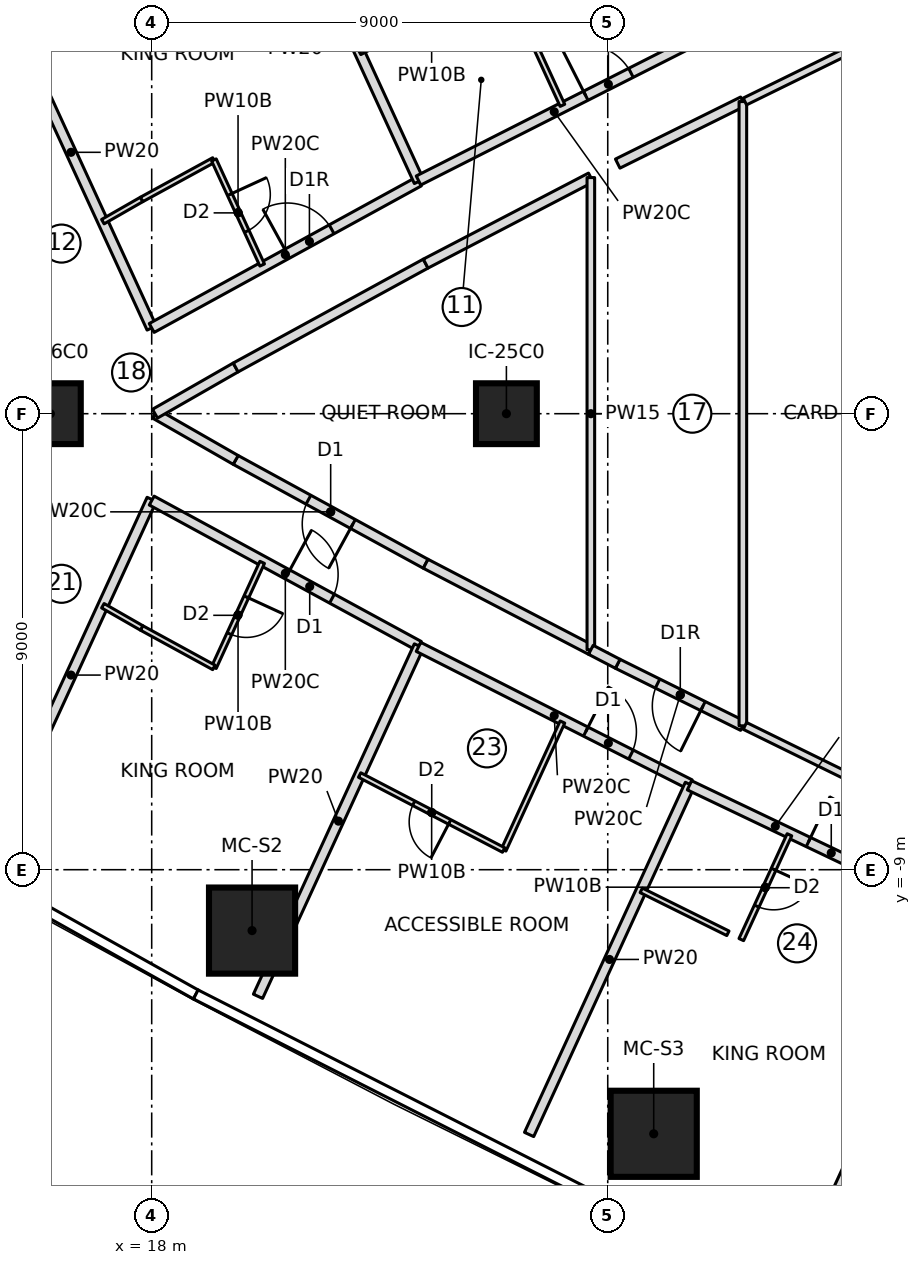
"""IFC4 building model, lengths in metres.
Left out: names, types, materials, properties, quantities, classifications, styles, units other than length and angle.
Written with IfcOpenShell. Run it as: python <this file> out.ifc"""

import sys

from ifc_helpers import new_model, si_unit, direction, frame, frame_2d, origin, origin_2d, place, context, subcontext, project, spatial, rectangle, extrude, element, fill, save


model = new_model("IFC4")
c1 = context("Model", 3, precision=1e-05, world=origin(), true_north=direction((0.0, 1.0)))
c2 = subcontext(c1, "Body", "Model", "MODEL_VIEW")
j1 = project(units=[si_unit("LENGTHUNIT", "METRE"), si_unit("PLANEANGLEUNIT", "RADIAN")], contexts=[c1])
p1 = place(None, origin())
s1 = spatial("IfcSite", under=j1, at=p1, CompositionType="ELEMENT")
p2 = place(p1, origin())
s2 = spatial("IfcBuilding", under=s1, at=p2, CompositionType="ELEMENT")
p3 = place(p2, frame((0.0, 0.0, 102.65)))
s3 = spatial("IfcBuildingStorey", under=s2, at=p3, CompositionType="ELEMENT", Elevation=102.65)
for number, where, z_axis, x_axis in (
    (1, (19.981, -10.202, 0.0), (0.0, 0.0, 1.0), (1.0, 0.0, 0.0)),
    (2, (27.907, -14.212, 0.0), (0.0, 0.0, 1.0), (1.0, 0.0, 0.0)),
):
    element("IfcColumn", number, at=place(p3, frame(where, z_axis=z_axis, x_axis=x_axis)), inside=s3, PredefinedType="COLUMN", context=c2, shape_type="SweptSolid", body=[
        extrude(rectangle(XDim=1.7, YDim=1.7, at=origin_2d()), origin(), (0.0, 0.0, 1.0), 3.55),
    ])
for number, where, z_axis, x_axis in (
    (3, (16.0, 0.0, 0.0), (0.0, 0.0, 1.0), (1.0, 0.0, 0.0)),
    (4, (25.0, 0.0, 0.0), (0.0, 0.0, 1.0), (1.0, 0.0, 0.0)),
):
    element("IfcColumn", number, at=place(p3, frame(where, z_axis=z_axis, x_axis=x_axis)), inside=s3, PredefinedType="COLUMN", context=c2, shape_type="SweptSolid", body=[
        extrude(rectangle(XDim=1.2, YDim=1.2, at=origin_2d()), origin(), (0.0, 0.0, 1.0), 3.55),
    ])
p4 = place(p3, frame((14.815, 8.626, 0.0), z_axis=(0.0, 0.0, 1.0), x_axis=(0.417432341259, -0.908708006166, 0.0)))
e5 = element("IfcWall", 5, at=p4, inside=s3, PredefinedType="PARTITIONING", context=c2, shape_type="SweptSolid", body=[
    extrude(rectangle(XDim=7.631, YDim=0.2, at=frame_2d((3.815, 0.0))), origin(), (0.0, 0.0, 1.0), 3.25),
])
p5 = place(p3, frame((18.0, 1.692, 0.0), z_axis=(0.0, 0.0, 1.0), x_axis=(0.876809096721, 0.480838650597, 0.0)))
e6 = element("IfcWall", 6, at=p5, inside=s3, PredefinedType="PARTITIONING", context=c2, shape_type="SweptSolid", body=[
    extrude(rectangle(XDim=6.015, YDim=0.2, at=frame_2d((3.008, 0.0))), origin(), (0.0, 0.0, 1.0), 3.25),
])
p6 = place(p5, frame((3.05, 0.0, 0.0)))
e7 = element("IfcOpeningElement", 7, at=p6, cuts=e6, PredefinedType="OPENING", context=c2, shape_type="SweptSolid", body=[
    extrude(rectangle(XDim=1.0, YDim=2.1, at=frame_2d((0.5, 1.05))), frame((0.0, 0.11, 0.0), z_axis=(0.0, -1.0, 0.0), x_axis=(1.0, 0.0, 0.0)), (0.0, 0.0, 1.0), 0.22),
])
p7 = place(p3, frame((17.036, 3.79, 0.0), z_axis=(0.0, 0.0, 1.0), x_axis=(0.867629162742, 0.497211862248, 0.0)))
e8 = element("IfcWall", 8, at=p7, inside=s3, PredefinedType="PARTITIONING", context=c2, shape_type="SweptSolid", body=[
    extrude(rectangle(XDim=0.882, YDim=0.1, at=frame_2d((0.441, 0.0))), origin(), (0.0, 0.0, 1.0), 3.25),
])
p8 = place(p3, frame((17.801, 4.229, 0.0), z_axis=(0.0, 0.0, 1.0), x_axis=(0.877424481957, 0.479714788663, 0.0)))
e9 = element("IfcWall", 9, at=p8, inside=s3, PredefinedType="PARTITIONING", context=c2, shape_type="SweptSolid", body=[
    extrude(rectangle(XDim=1.625, YDim=0.1, at=frame_2d((0.813, 0.0))), origin(), (0.0, 0.0, 1.0), 3.25),
])
p9 = place(p3, frame((19.228, 5.008, 0.0), z_axis=(0.0, 0.0, 1.0), x_axis=(0.417450047292, -0.908699872354, 0.0)))
e10 = element("IfcWall", 10, at=p9, inside=s3, PredefinedType="PARTITIONING", context=c2, shape_type="SweptSolid", body=[
    extrude(rectangle(XDim=2.283, YDim=0.1, at=frame_2d((1.141, 0.0))), origin(), (0.0, 0.0, 1.0), 3.25),
])
p10 = place(p9, frame((0.75, 0.0, 0.0)))
e11 = element("IfcOpeningElement", 11, at=p10, cuts=e10, PredefinedType="OPENING", context=c2, shape_type="SweptSolid", body=[
    extrude(rectangle(XDim=0.8, YDim=2.1, at=frame_2d((0.4, 1.05))), frame((0.0, 0.06, 0.0), z_axis=(0.0, -1.0, 0.0), x_axis=(1.0, 0.0, 0.0)), (0.0, 0.0, 1.0), 0.12),
])
p11 = place(p3, frame((23.274, 4.584, 0.0), z_axis=(0.0, 0.0, 1.0), x_axis=(-0.417440028355, 0.908704474913, 0.0)))
e12 = element("IfcWall", 12, at=p11, inside=s3, PredefinedType="PARTITIONING", context=c2, shape_type="SweptSolid", body=[
    extrude(rectangle(XDim=7.61, YDim=0.2, at=frame_2d((3.805, 0.0))), origin(), (0.0, 0.0, 1.0), 3.25),
])
p12 = place(p3, frame((23.266, 4.602, 0.0), z_axis=(0.0, 0.0, 1.0), x_axis=(0.892007141151, 0.452021304958, 0.0)))
e13 = element("IfcWall", 13, at=p12, inside=s3, PredefinedType="PARTITIONING", context=c2, shape_type="SweptSolid", body=[
    extrude(rectangle(XDim=6.004, YDim=0.2, at=frame_2d((3.002, 0.0))), origin(), (0.0, 0.0, 1.0), 3.25),
])
p13 = place(p12, frame((3.7, 0.0, 0.0)))
e14 = element("IfcOpeningElement", 14, at=p13, cuts=e13, PredefinedType="OPENING", context=c2, shape_type="SweptSolid", body=[
    extrude(rectangle(XDim=1.0, YDim=2.1, at=frame_2d((0.5, 1.05))), frame((0.0, 0.11, 0.0), z_axis=(0.0, -1.0, 0.0), x_axis=(1.0, 0.0, 0.0)), (0.0, 0.0, 1.0), 0.22),
])
p14 = place(p3, frame((22.104, 7.132, 0.0), z_axis=(0.0, 0.0, 1.0), x_axis=(0.886865947566, 0.46202682936, 0.0)))
e15 = element("IfcWall", 15, at=p14, inside=s3, PredefinedType="PARTITIONING", context=c2, shape_type="SweptSolid", body=[
    extrude(rectangle(XDim=3.204, YDim=0.1, at=frame_2d((1.602, 0.0))), origin(), (0.0, 0.0, 1.0), 3.25),
])
p15 = place(p14, frame((1.2, 0.0, 0.0)))
e16 = element("IfcOpeningElement", 16, at=p15, cuts=e15, PredefinedType="OPENING", context=c2, shape_type="SweptSolid", body=[
    extrude(rectangle(XDim=0.8, YDim=2.1, at=frame_2d((0.4, 1.05))), frame((0.0, 0.06, 0.0), z_axis=(0.0, -1.0, 0.0), x_axis=(1.0, 0.0, 0.0)), (0.0, 0.0, 1.0), 0.12),
])
p16 = place(p3, frame((24.945, 8.612, 0.0), z_axis=(0.0, 0.0, 1.0), x_axis=(0.417431588167, -0.908708352113, 0.0)))
e17 = element("IfcWall", 17, at=p16, inside=s3, PredefinedType="PARTITIONING", context=c2, shape_type="SweptSolid", body=[
    extrude(rectangle(XDim=2.781, YDim=0.1, at=frame_2d((1.39, 0.0))), origin(), (0.0, 0.0, 1.0), 3.25),
])
p17 = place(p3, frame((14.815, -8.626, 0.0), z_axis=(0.0, 0.0, 1.0), x_axis=(0.417432341259, 0.908708006166, 0.0)))
e18 = element("IfcWall", 18, at=p17, inside=s3, PredefinedType="PARTITIONING", context=c2, shape_type="SweptSolid", body=[
    extrude(rectangle(XDim=7.631, YDim=0.2, at=frame_2d((3.815, 0.0))), origin(), (0.0, 0.0, 1.0), 3.25),
])
p18 = place(p3, frame((18.0, -1.715, 0.0), z_axis=(0.0, 0.0, 1.0), x_axis=(0.878415628048, -0.477897462225, 0.0)))
e19 = element("IfcWall", 19, at=p18, inside=s3, PredefinedType="PARTITIONING", context=c2, shape_type="SweptSolid", body=[
    extrude(rectangle(XDim=6.004, YDim=0.2, at=frame_2d((3.002, 0.0))), origin(), (0.0, 0.0, 1.0), 3.25),
])
p19 = place(p18, frame((3.05, 0.0, 0.0)))
e20 = element("IfcOpeningElement", 20, at=p19, cuts=e19, PredefinedType="OPENING", context=c2, shape_type="SweptSolid", body=[
    extrude(rectangle(XDim=1.0, YDim=2.1, at=frame_2d((0.5, 1.05))), frame((0.0, 0.11, 0.0), z_axis=(0.0, -1.0, 0.0), x_axis=(1.0, 0.0, 0.0)), (0.0, 0.0, 1.0), 0.22),
])
p20 = place(p3, frame((20.18, -2.934, 0.0), z_axis=(0.0, 0.0, 1.0), x_axis=(-0.417450047292, -0.908699872354, 0.0)))
e21 = element("IfcWall", 21, at=p20, inside=s3, PredefinedType="PARTITIONING", context=c2, shape_type="SweptSolid", body=[
    extrude(rectangle(XDim=2.283, YDim=0.1, at=frame_2d((1.141, 0.0))), origin(), (0.0, 0.0, 1.0), 3.25),
])
p21 = place(p20, frame((0.75, 0.0, 0.0)))
e22 = element("IfcOpeningElement", 22, at=p21, cuts=e21, PredefinedType="OPENING", context=c2, shape_type="SweptSolid", body=[
    extrude(rectangle(XDim=0.8, YDim=2.1, at=frame_2d((0.4, 1.05))), frame((0.0, 0.06, 0.0), z_axis=(0.0, -1.0, 0.0), x_axis=(1.0, 0.0, 0.0)), (0.0, 0.0, 1.0), 0.12),
])
p22 = place(p3, frame((19.228, -5.008, 0.0), z_axis=(0.0, 0.0, 1.0), x_axis=(-0.877424481957, 0.479714788663, 0.0)))
e23 = element("IfcWall", 23, at=p22, inside=s3, PredefinedType="PARTITIONING", context=c2, shape_type="SweptSolid", body=[
    extrude(rectangle(XDim=1.625, YDim=0.1, at=frame_2d((0.813, 0.0))), origin(), (0.0, 0.0, 1.0), 3.25),
])
p23 = place(p3, frame((17.801, -4.229, 0.0), z_axis=(0.0, 0.0, 1.0), x_axis=(-0.867629162742, 0.497211862248, 0.0)))
e24 = element("IfcWall", 24, at=p23, inside=s3, PredefinedType="PARTITIONING", context=c2, shape_type="SweptSolid", body=[
    extrude(rectangle(XDim=0.882, YDim=0.1, at=frame_2d((0.441, 0.0))), origin(), (0.0, 0.0, 1.0), 3.25),
])
p24 = place(p3, frame((20.098, -11.499, 0.0), z_axis=(0.0, 0.0, 1.0), x_axis=(0.417440028355, 0.908704474913, 0.0)))
e25 = element("IfcWall", 25, at=p24, inside=s3, PredefinedType="PARTITIONING", context=c2, shape_type="SweptSolid", body=[
    extrude(rectangle(XDim=7.61, YDim=0.2, at=frame_2d((3.805, 0.0))), origin(), (0.0, 0.0, 1.0), 3.25),
])
p25 = place(p3, frame((23.266, -4.602, 0.0), z_axis=(0.0, 0.0, 1.0), x_axis=(0.892007141151, -0.452021304958, 0.0)))
e26 = element("IfcWall", 26, at=p25, inside=s3, PredefinedType="PARTITIONING", context=c2, shape_type="SweptSolid", body=[
    extrude(rectangle(XDim=6.004, YDim=0.2, at=frame_2d((3.002, 0.0))), origin(), (0.0, 0.0, 1.0), 3.25),
])
p26 = place(p25, frame((3.7, 0.0, 0.0)))
e27 = element("IfcOpeningElement", 27, at=p26, cuts=e26, PredefinedType="OPENING", context=c2, shape_type="SweptSolid", body=[
    extrude(rectangle(XDim=1.0, YDim=2.1, at=frame_2d((0.5, 1.05))), frame((0.0, 0.11, 0.0), z_axis=(0.0, -1.0, 0.0), x_axis=(1.0, 0.0, 0.0)), (0.0, 0.0, 1.0), 0.22),
])
p27 = place(p3, frame((26.106, -6.085, 0.0), z_axis=(0.0, 0.0, 1.0), x_axis=(-0.417431588167, -0.908708352113, 0.0)))
e28 = element("IfcWall", 28, at=p27, inside=s3, PredefinedType="PARTITIONING", context=c2, shape_type="SweptSolid", body=[
    extrude(rectangle(XDim=2.781, YDim=0.1, at=frame_2d((1.39, 0.0))), origin(), (0.0, 0.0, 1.0), 3.25),
])
p28 = place(p3, frame((24.945, -8.612, 0.0), z_axis=(0.0, 0.0, 1.0), x_axis=(-0.886865947566, 0.46202682936, 0.0)))
e29 = element("IfcWall", 29, at=p28, inside=s3, PredefinedType="PARTITIONING", context=c2, shape_type="SweptSolid", body=[
    extrude(rectangle(XDim=3.204, YDim=0.1, at=frame_2d((1.602, 0.0))), origin(), (0.0, 0.0, 1.0), 3.25),
])
p29 = place(p28, frame((1.2, 0.0, 0.0)))
e30 = element("IfcOpeningElement", 30, at=p29, cuts=e29, PredefinedType="OPENING", context=c2, shape_type="SweptSolid", body=[
    extrude(rectangle(XDim=0.8, YDim=2.1, at=frame_2d((0.4, 1.05))), frame((0.0, 0.06, 0.0), z_axis=(0.0, -1.0, 0.0), x_axis=(1.0, 0.0, 0.0)), (0.0, 0.0, 1.0), 0.12),
])
p30 = place(p3, frame((25.448, -14.226, 0.0), z_axis=(0.0, 0.0, 1.0), x_axis=(0.417428513692, 0.908709764422, 0.0)))
e31 = element("IfcWall", 31, at=p30, inside=s3, PredefinedType="PARTITIONING", context=c2, shape_type="SweptSolid", body=[
    extrude(rectangle(XDim=7.603, YDim=0.2, at=frame_2d((3.802, 0.0))), origin(), (0.0, 0.0, 1.0), 3.25),
])
p31 = place(p3, frame((28.613, -7.335, 0.0), z_axis=(0.0, 0.0, 1.0), x_axis=(0.902499429765, -0.430691048518, 0.0)))
e32 = element("IfcWall", 32, at=p31, inside=s3, PredefinedType="PARTITIONING", context=c2, shape_type="SweptSolid", body=[
    extrude(rectangle(XDim=3.753, YDim=0.2, at=frame_2d((1.876, 0.0))), origin(), (0.0, 0.0, 1.0), 3.25),
])
p32 = place(p31, frame((2.6, 0.0, 0.0)))
e33 = element("IfcOpeningElement", 33, at=p32, cuts=e32, PredefinedType="OPENING", context=c2, shape_type="SweptSolid", body=[
    extrude(rectangle(XDim=1.0, YDim=2.1, at=frame_2d((0.5, 1.05))), frame((0.0, 0.11, 0.0), z_axis=(0.0, -1.0, 0.0), x_axis=(1.0, 0.0, 0.0)), (0.0, 0.0, 1.0), 0.22),
])
p33 = place(p3, frame((30.586, -8.31, 0.0), z_axis=(0.0, 0.0, 1.0), x_axis=(-0.417466676952, -0.908692232626, 0.0)))
e34 = element("IfcWall", 34, at=p33, inside=s3, PredefinedType="PARTITIONING", context=c2, shape_type="SweptSolid", body=[
    extrude(rectangle(XDim=2.277, YDim=0.1, at=frame_2d((1.139, 0.0))), origin(), (0.0, 0.0, 1.0), 3.25),
])
p34 = place(p33, frame((0.75, 0.0, 0.0)))
e35 = element("IfcOpeningElement", 35, at=p34, cuts=e34, PredefinedType="OPENING", context=c2, shape_type="SweptSolid", body=[
    extrude(rectangle(XDim=0.8, YDim=2.1, at=frame_2d((0.4, 1.05))), frame((0.0, 0.06, 0.0), z_axis=(0.0, -1.0, 0.0), x_axis=(1.0, 0.0, 0.0)), (0.0, 0.0, 1.0), 0.12),
])
p35 = place(p3, frame((29.371, -10.255, 0.0), z_axis=(0.0, 0.0, 1.0), x_axis=(-0.895982200486, 0.444089964324, 0.0)))
e36 = element("IfcWall", 36, at=p35, inside=s3, PredefinedType="PARTITIONING", context=c2, shape_type="SweptSolid", body=[
    extrude(rectangle(XDim=1.909, YDim=0.1, at=frame_2d((0.954, 0.0))), origin(), (0.0, 0.0, 1.0), 3.25),
])
p36 = place(p3, frame((30.861, -16.815, 0.0), z_axis=(0.0, 0.0, 1.0), x_axis=(0.417441426461, 0.908703832651, 0.0)))
e37 = element("IfcWall", 37, at=p36, inside=s3, PredefinedType="PARTITIONING", context=c2, shape_type="SweptSolid", body=[
    extrude(rectangle(XDim=6.399, YDim=0.2, at=frame_2d((3.2, 0.0))), origin(), (0.0, 0.0, 1.0), 3.25),
])
p37 = place(p3, frame((23.407, -2.962, 0.0), z_axis=(0.0, 0.0, 1.0), x_axis=(-0.877465075585, 0.479640533242, 0.0)))
e38 = element("IfcWall", 38, at=p37, inside=s3, PredefinedType="PARTITIONING", context=c2, shape_type="SweptSolid", body=[
    extrude(rectangle(XDim=4.273, YDim=0.2, at=frame_2d((2.137, 0.0))), origin(), (0.0, 0.0, 1.0), 3.25),
])
p38 = place(p37, frame((1.636, 0.0, 0.0)))
e39 = element("IfcOpeningElement", 39, at=p38, cuts=e38, PredefinedType="OPENING", context=c2, shape_type="SweptSolid", body=[
    extrude(rectangle(XDim=1.0, YDim=2.1, at=frame_2d((0.5, 1.05))), frame((0.0, 0.11, 0.0), z_axis=(0.0, -1.0, 0.0), x_axis=(1.0, 0.0, 0.0)), (0.0, 0.0, 1.0), 0.22),
])
for number, where, z_axis, x_axis in (
    (40, (19.657, -0.912, 0.0), (0.0, 0.0, 1.0), (-0.868, 0.497, 0.0)),
    (41, (18.065, 0.0, 0.0), (0.0, 0.0, 1.0), (0.868, 0.497, 0.0)),
):
    element("IfcWall", number, at=place(p3, frame(where, z_axis=z_axis, x_axis=x_axis)), inside=s3, PredefinedType="PARTITIONING", context=c2, shape_type="SweptSolid", body=[
        extrude(rectangle(XDim=1.835, YDim=0.2, at=frame_2d((0.918, 0.0))), origin(), (0.0, 0.0, 1.0), 3.25),
    ])
p39 = place(p3, frame((19.657, 0.912, 0.0), z_axis=(0.0, 0.0, 1.0), x_axis=(0.877465075585, 0.479640533242, 0.0)))
e42 = element("IfcWall", 42, at=p39, inside=s3, PredefinedType="PARTITIONING", context=c2, shape_type="SweptSolid", body=[
    extrude(rectangle(XDim=4.273, YDim=0.2, at=frame_2d((2.137, 0.0))), origin(), (0.0, 0.0, 1.0), 3.25),
])
for number, where, z_axis, x_axis in (
    (43, (23.407, 2.962, 0.0), (0.0, 0.0, 1.0), (0.887, 0.462, 0.0)),
    (44, (26.667, -4.66, 0.0), (0.0, 0.0, 1.0), (-0.887, 0.462, 0.0)),
):
    element("IfcWall", number, at=place(p3, frame(where, z_axis=z_axis, x_axis=x_axis)), inside=s3, PredefinedType="PARTITIONING", context=c2, shape_type="SweptSolid", body=[
        extrude(rectangle(XDim=3.676, YDim=0.2, at=frame_2d((1.838, 0.0))), origin(), (0.0, 0.0, 1.0), 3.25),
    ])
p40 = place(p3, frame((26.667, -4.66, 0.0), z_axis=(0.0, 0.0, 1.0), x_axis=(0.0, 1.0, 0.0)))
e45 = element("IfcWall", 45, at=p40, inside=s3, PredefinedType="PARTITIONING", context=c2, shape_type="SweptSolid", body=[
    extrude(rectangle(XDim=9.32, YDim=0.15, at=frame_2d((4.66, 0.0))), origin(), (0.0, 0.0, 1.0), 3.25),
])
p41 = place(p3, frame((29.667, -6.16, 0.0), z_axis=(0.0, 0.0, 1.0), x_axis=(-0.895945057464, 0.444164895062, 0.0)))
e46 = element("IfcWall", 46, at=p41, inside=s3, PredefinedType="PARTITIONING", context=c2, shape_type="SweptSolid", body=[
    extrude(rectangle(XDim=2.757, YDim=0.2, at=frame_2d((1.378, 0.0))), origin(), (0.0, 0.0, 1.0), 3.25),
])
p42 = place(p41, frame((0.878, 0.0, 0.0)))
e47 = element("IfcOpeningElement", 47, at=p42, cuts=e46, PredefinedType="OPENING", context=c2, shape_type="SweptSolid", body=[
    extrude(rectangle(XDim=1.0, YDim=2.1, at=frame_2d((0.5, 1.05))), frame((0.0, 0.11, 0.0), z_axis=(0.0, -1.0, 0.0), x_axis=(1.0, 0.0, 0.0)), (0.0, 0.0, 1.0), 0.22),
])
p43 = place(p3, frame((27.196, 4.936, 0.0), z_axis=(0.0, 0.0, 1.0), x_axis=(0.895945057464, 0.444164895062, 0.0)))
e48 = element("IfcWall", 48, at=p43, inside=s3, PredefinedType="PARTITIONING", context=c2, shape_type="SweptSolid", body=[
    extrude(rectangle(XDim=2.757, YDim=0.2, at=frame_2d((1.378, 0.0))), origin(), (0.0, 0.0, 1.0), 3.25),
])
p44 = place(p3, frame((29.667, -6.16, 0.0), z_axis=(0.0, 0.0, 1.0), x_axis=(0.0, 1.0, 0.0)))
e49 = element("IfcWall", 49, at=p44, inside=s3, PredefinedType="PARTITIONING", context=c2, shape_type="SweptSolid", body=[
    extrude(rectangle(XDim=12.321, YDim=0.15, at=frame_2d((6.16, 0.0))), origin(), (0.0, 0.0, 1.0), 3.25),
])
for number, where, z_axis, x_axis in (
    (50, (31.995, -7.285, 0.0), (0.0, 0.0, 1.0), (-0.898, 0.441, 0.0)),
    (51, (29.707, 6.162, 0.0), (0.0, 0.0, 1.0), (0.898, 0.441, 0.0)),
):
    element("IfcWall", number, at=place(p3, frame(where, z_axis=z_axis, x_axis=x_axis)), inside=s3, PredefinedType="PARTITIONING", context=c2, shape_type="SweptSolid", body=[
        extrude(rectangle(XDim=2.549, YDim=0.15, at=frame_2d((1.275, 0.0))), origin(), (0.0, 0.0, 1.0), 3.25),
    ])
p45 = place(p3, frame((27.196, -4.936, 0.0), z_axis=(0.0, 0.0, 1.0), x_axis=(-0.886948968309, 0.46186743511, 0.0)))
e52 = element("IfcWall", 52, at=p45, inside=s3, PredefinedType="PARTITIONING", context=c2, shape_type="SweptSolid", body=[
    extrude(rectangle(XDim=0.597, YDim=0.2, at=frame_2d((0.299, 0.0))), origin(), (0.0, 0.0, 1.0), 3.25),
])
p46 = place(p10, origin())
e53 = element("IfcDoor", 53, at=p46, inside=s3, OperationType="SINGLE_SWING_LEFT", PredefinedType="DOOR", context=c2, shape_type="SweptSolid", body=[
    extrude(rectangle(XDim=0.8, YDim=2.1, at=frame_2d((0.4, 1.05))), frame((0.0, 0.025, 0.0), z_axis=(0.0, -1.0, 0.0), x_axis=(1.0, 0.0, 0.0)), (0.0, 0.0, 1.0), 0.05),
])
fill(e11, e53)
p47 = place(p6, origin())
e54 = element("IfcDoor", 54, at=p47, inside=s3, OperationType="SINGLE_SWING_RIGHT", PredefinedType="DOOR", context=c2, shape_type="SweptSolid", body=[
    extrude(rectangle(XDim=1.0, YDim=2.1, at=frame_2d((0.5, 1.05))), frame((0.0, 0.025, 0.0), z_axis=(0.0, -1.0, 0.0), x_axis=(1.0, 0.0, 0.0)), (0.0, 0.0, 1.0), 0.05),
])
fill(e7, e54)
p48 = place(p13, origin())
e55 = element("IfcDoor", 55, at=p48, inside=s3, OperationType="SINGLE_SWING_RIGHT", PredefinedType="DOOR", context=c2, shape_type="SweptSolid", body=[
    extrude(rectangle(XDim=1.0, YDim=2.1, at=frame_2d((0.5, 1.05))), frame((0.0, 0.025, 0.0), z_axis=(0.0, -1.0, 0.0), x_axis=(1.0, 0.0, 0.0)), (0.0, 0.0, 1.0), 0.05),
])
fill(e14, e55)
p49 = place(p21, origin())
e56 = element("IfcDoor", 56, at=p49, inside=s3, OperationType="SINGLE_SWING_LEFT", PredefinedType="DOOR", context=c2, shape_type="SweptSolid", body=[
    extrude(rectangle(XDim=0.8, YDim=2.1, at=frame_2d((0.4, 1.05))), frame((0.0, 0.025, 0.0), z_axis=(0.0, -1.0, 0.0), x_axis=(1.0, 0.0, 0.0)), (0.0, 0.0, 1.0), 0.05),
])
fill(e22, e56)
p50 = place(p19, origin())
e57 = element("IfcDoor", 57, at=p50, inside=s3, OperationType="SINGLE_SWING_LEFT", PredefinedType="DOOR", context=c2, shape_type="SweptSolid", body=[
    extrude(rectangle(XDim=1.0, YDim=2.1, at=frame_2d((0.5, 1.05))), frame((0.0, 0.025, 0.0), z_axis=(0.0, -1.0, 0.0), x_axis=(1.0, 0.0, 0.0)), (0.0, 0.0, 1.0), 0.05),
])
fill(e20, e57)
p51 = place(p29, origin())
e58 = element("IfcDoor", 58, at=p51, inside=s3, OperationType="SINGLE_SWING_LEFT", PredefinedType="DOOR", context=c2, shape_type="SweptSolid", body=[
    extrude(rectangle(XDim=0.8, YDim=2.1, at=frame_2d((0.4, 1.05))), frame((0.0, 0.025, 0.0), z_axis=(0.0, -1.0, 0.0), x_axis=(1.0, 0.0, 0.0)), (0.0, 0.0, 1.0), 0.05),
])
fill(e30, e58)
p52 = place(p26, origin())
e59 = element("IfcDoor", 59, at=p52, inside=s3, OperationType="SINGLE_SWING_LEFT", PredefinedType="DOOR", context=c2, shape_type="SweptSolid", body=[
    extrude(rectangle(XDim=1.0, YDim=2.1, at=frame_2d((0.5, 1.05))), frame((0.0, 0.025, 0.0), z_axis=(0.0, -1.0, 0.0), x_axis=(1.0, 0.0, 0.0)), (0.0, 0.0, 1.0), 0.05),
])
fill(e27, e59)
p53 = place(p34, origin())
e60 = element("IfcDoor", 60, at=p53, inside=s3, OperationType="SINGLE_SWING_LEFT", PredefinedType="DOOR", context=c2, shape_type="SweptSolid", body=[
    extrude(rectangle(XDim=0.8, YDim=2.1, at=frame_2d((0.4, 1.05))), frame((0.0, 0.025, 0.0), z_axis=(0.0, -1.0, 0.0), x_axis=(1.0, 0.0, 0.0)), (0.0, 0.0, 1.0), 0.05),
])
fill(e35, e60)
p54 = place(p32, origin())
e61 = element("IfcDoor", 61, at=p54, inside=s3, OperationType="SINGLE_SWING_LEFT", PredefinedType="DOOR", context=c2, shape_type="SweptSolid", body=[
    extrude(rectangle(XDim=1.0, YDim=2.1, at=frame_2d((0.5, 1.05))), frame((0.0, 0.025, 0.0), z_axis=(0.0, -1.0, 0.0), x_axis=(1.0, 0.0, 0.0)), (0.0, 0.0, 1.0), 0.05),
])
fill(e33, e61)
p55 = place(p38, origin())
e62 = element("IfcDoor", 62, at=p55, inside=s3, OperationType="SINGLE_SWING_LEFT", PredefinedType="DOOR", context=c2, shape_type="SweptSolid", body=[
    extrude(rectangle(XDim=1.0, YDim=2.1, at=frame_2d((0.5, 1.05))), frame((0.0, 0.025, 0.0), z_axis=(0.0, -1.0, 0.0), x_axis=(1.0, 0.0, 0.0)), (0.0, 0.0, 1.0), 0.05),
])
fill(e39, e62)
p56 = place(p42, origin())
e63 = element("IfcDoor", 63, at=p56, inside=s3, OperationType="SINGLE_SWING_RIGHT", PredefinedType="DOOR", context=c2, shape_type="SweptSolid", body=[
    extrude(rectangle(XDim=1.0, YDim=2.1, at=frame_2d((0.5, 1.05))), frame((0.0, 0.025, 0.0), z_axis=(0.0, -1.0, 0.0), x_axis=(1.0, 0.0, 0.0)), (0.0, 0.0, 1.0), 0.05),
])
fill(e47, e63)
save(model, sys.argv[1])
